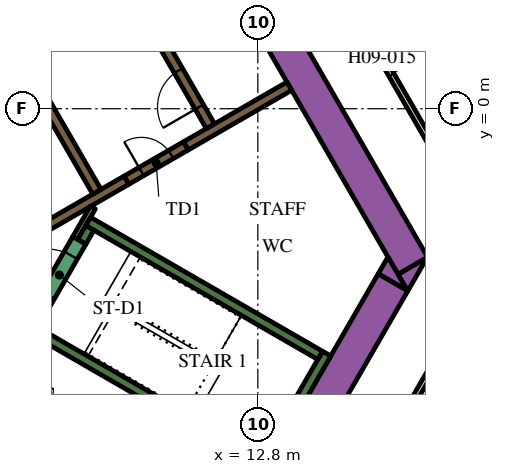
"""IFC4 building model, lengths in metres.
Left out: names, types, materials, properties, quantities, classifications, styles, units other than length and angle.
Written with IfcOpenShell. Run it as: python <this file> out.ifc"""

import sys

from ifc_helpers import new_model, si_unit, direction, frame, frame_2d, origin, place, context, subcontext, project, spatial, polyline, rectangle, outline, extrude, element, fill, save


model = new_model("IFC4")
c1 = context("Model", 3, precision=1e-05, world=origin(), true_north=direction((0.0, 1.0)))
c2 = subcontext(c1, "Body", "Model", "MODEL_VIEW")
j1 = project(units=[si_unit("LENGTHUNIT", "METRE"), si_unit("PLANEANGLEUNIT", "RADIAN")], contexts=[c1])
p1 = place(None, origin())
s1 = spatial("IfcSite", under=j1, at=p1, CompositionType="ELEMENT")
p2 = place(p1, origin())
s2 = spatial("IfcBuilding", under=s1, at=p2, CompositionType="ELEMENT")
p3 = place(p2, frame((0.0, 0.0, 118.8)))
s3 = spatial("IfcBuildingStorey", under=s2, at=p3, CompositionType="ELEMENT", Elevation=118.8)
p4 = place(p3, frame((6.776, 13.364, 0.0), z_axis=(0.0, 0.0, 1.0), x_axis=(0.500004177138, -0.8660229921, 0.0)))
e1 = element("IfcWall", 1, at=p4, inside=s3, PredefinedType="SOLIDWALL", context=c2, shape_type="SweptSolid", body=[
    extrude(rectangle(XDim=20.204, YDim=0.9, at=frame_2d((10.102, 0.0))), origin(), (0.0, 0.0, 1.0), 3.9),
])
p5 = place(p3, origin())
e2 = element("IfcWall", 2, at=p5, inside=s3, PredefinedType="SOLIDWALL", context=c2, shape_type="SweptSolid", body=[
    extrude(outline(polyline([(16.743, -4.8), (16.489, -4.36), (17.251, -3.92), (16.743, -4.8)])), origin(), (0.0, 0.0, 1.0), 3.9),
])
p6 = place(p3, frame((11.943, -12.214, 0.0), z_axis=(0.0, 0.0, 1.0), x_axis=(0.49998092645, 0.866036415623, 0.0)))
e3 = element("IfcWall", 3, at=p6, inside=s3, PredefinedType="SOLIDWALL", context=c2, shape_type="SweptSolid", body=[
    extrude(rectangle(XDim=8.83, YDim=0.9, at=frame_2d((4.415, 0.0))), origin(), (0.0, 0.0, 1.0), 3.9),
])
e4 = element("IfcWall", 4, at=p5, inside=s3, PredefinedType="SOLIDWALL", context=c2, shape_type="SweptSolid", body=[
    extrude(outline(polyline([(16.223, -3.9), (16.732, -4.78), (15.969, -4.34), (16.223, -3.9)])), origin(), (0.0, 0.0, 1.0), 3.9),
])
p7 = place(p3, frame((12.885, -9.431, 0.0), z_axis=(0.0, 0.0, 1.0), x_axis=(0.500020560727, 0.866013532718, 0.0)))
e5 = element("IfcWall", 5, at=p7, inside=s3, PredefinedType="SOLIDWALL", context=c2, shape_type="SweptSolid", body=[
    extrude(rectangle(XDim=3.45, YDim=0.25, at=frame_2d((1.725, 0.0))), origin(), (0.0, 0.0, 1.0), 3.9),
])
p8 = place(p3, frame((12.84, -9.261, 0.0), z_axis=(0.0, 0.0, 1.0), x_axis=(-0.866013990052, 0.500019768644, 0.0)))
e6 = element("IfcWall", 6, at=p8, inside=s3, PredefinedType="SOLIDWALL", context=c2, shape_type="SweptSolid", body=[
    extrude(rectangle(XDim=6.8, YDim=0.25, at=frame_2d((3.4, 0.0))), origin(), (0.0, 0.0, 1.0), 3.9),
])
p9 = place(p3, frame((8.334, -2.964, 0.0), z_axis=(0.0, 0.0, 1.0), x_axis=(0.866016039709, -0.500016218704, 0.0)))
e7 = element("IfcWall", 7, at=p9, inside=s3, PredefinedType="SOLIDWALL", context=c2, shape_type="SweptSolid", body=[
    extrude(rectangle(XDim=7.05, YDim=0.25, at=frame_2d((3.525, 0.0))), origin(), (0.0, 0.0, 1.0), 3.9),
])
p10 = place(p3, frame((8.168, -3.503, 0.0), z_axis=(0.0, 0.0, 1.0), x_axis=(0.49972245349, 0.866185586049, 0.0)))
e8 = element("IfcWall", 8, at=p10, inside=s3, PredefinedType="SOLIDWALL", context=c2, shape_type="SweptSolid", body=[
    extrude(rectangle(XDim=0.425, YDim=0.25, at=frame_2d((0.212, 0.0))), origin(), (0.0, 0.0, 1.0), 3.9),
])
p11 = place(p3, frame((13.629, 0.594, 0.0), z_axis=(0.0, 0.0, 1.0), x_axis=(-0.86602790099, -0.499995674689, 0.0)))
e9 = element("IfcWall", 9, at=p11, inside=s3, PredefinedType="SOLIDWALL", context=c2, shape_type="SweptSolid", body=[
    extrude(rectangle(XDim=3.146, YDim=0.25, at=frame_2d((1.573, 0.0))), origin(), (0.0, 0.0, 1.0), 3.9),
])
p12 = place(p3, frame((9.346, -1.879, 0.0), z_axis=(0.0, 0.0, 1.0), x_axis=(-0.866048528039, -0.499959945477, 0.0)))
e10 = element("IfcWall", 10, at=p12, inside=s3, PredefinedType="SOLIDWALL", context=c2, shape_type="SweptSolid", body=[
    extrude(rectangle(XDim=3.47, YDim=0.25, at=frame_2d((1.735, 0.0))), origin(), (0.0, 0.0, 1.0), 3.9),
])
p13 = place(p3, frame((8.459, -2.599, 0.0), z_axis=(0.0, 0.0, 1.0), x_axis=(-0.500041054325, -0.866001699761, 0.0)))
e11 = element("IfcWall", 11, at=p13, inside=s3, PredefinedType="PARTITIONING", context=c2, shape_type="SweptSolid", body=[
    extrude(rectangle(XDim=0.929, YDim=0.15, at=frame_2d((0.464, 0.0))), origin(), (0.0, 0.0, 1.0), 3.9),
])
p14 = place(p3, frame((11.553, -0.46, 0.0), z_axis=(0.0, 0.0, 1.0), x_axis=(-0.500006514828, 0.866021642414, 0.0)))
e12 = element("IfcWall", 12, at=p14, inside=s3, PredefinedType="SOLIDWALL", context=c2, shape_type="SweptSolid", body=[
    extrude(rectangle(XDim=12.35, YDim=0.25, at=frame_2d((6.175, 0.0))), origin(), (0.0, 0.0, 1.0), 3.9),
])
p15 = place(p14, frame((0.585, 0.0, 0.0)))
e13 = element("IfcOpeningElement", 13, at=p15, cuts=e12, PredefinedType="OPENING", context=c2, shape_type="SweptSolid", body=[
    extrude(rectangle(XDim=1.1, YDim=2.1, at=frame_2d((0.55, 1.05))), frame((0.0, 0.135, 0.0), z_axis=(0.0, -1.0, 0.0), x_axis=(1.0, 0.0, 0.0)), (0.0, 0.0, 1.0), 0.27),
])
p16 = place(p14, frame((3.105, 0.0, 0.0)))
e14 = element("IfcOpeningElement", 14, at=p16, cuts=e12, PredefinedType="OPENING", context=c2, shape_type="SweptSolid", body=[
    extrude(rectangle(XDim=1.1, YDim=2.1, at=frame_2d((0.55, 1.05))), frame((0.0, 0.135, 0.0), z_axis=(0.0, -1.0, 0.0), x_axis=(1.0, 0.0, 0.0)), (0.0, 0.0, 1.0), 0.27),
])
p17 = place(p14, frame((5.625, 0.0, 0.0)))
e15 = element("IfcOpeningElement", 15, at=p17, cuts=e12, PredefinedType="OPENING", context=c2, shape_type="SweptSolid", body=[
    extrude(rectangle(XDim=1.1, YDim=2.1, at=frame_2d((0.55, 1.05))), frame((0.0, 0.135, 0.0), z_axis=(0.0, -1.0, 0.0), x_axis=(1.0, 0.0, 0.0)), (0.0, 0.0, 1.0), 0.27),
])
p18 = place(p3, frame((8.565, -2.185, 0.0), z_axis=(0.0, 0.0, 1.0), x_axis=(-0.499997954832, 0.866026584559, 0.0)))
e16 = element("IfcWall", 16, at=p18, inside=s3, PredefinedType="SOLIDWALL", context=c2, shape_type="SweptSolid", body=[
    extrude(rectangle(XDim=12.35, YDim=0.25, at=frame_2d((6.175, 0.0))), origin(), (0.0, 0.0, 1.0), 3.9),
])
p19 = place(p18, frame((5.725, 0.0, 0.0)))
e17 = element("IfcOpeningElement", 17, at=p19, cuts=e16, PredefinedType="OPENING", context=c2, shape_type="SweptSolid", body=[
    extrude(rectangle(XDim=0.9, YDim=2.1, at=frame_2d((0.45, 1.05))), frame((0.0, 0.135, 0.0), z_axis=(0.0, -1.0, 0.0), x_axis=(1.0, 0.0, 0.0)), (0.0, 0.0, 1.0), 0.27),
])
p20 = place(p3, frame((7.053, -5.284, 0.0), z_axis=(0.0, 0.0, 1.0), x_axis=(0.500078061341, 0.865980330357, 0.0)))
e18 = element("IfcWall", 18, at=p20, inside=s3, PredefinedType="SOLIDWALL", context=c2, shape_type="SweptSolid", body=[
    extrude(rectangle(XDim=2.1, YDim=0.4, at=frame_2d((1.05, 0.0))), origin(), (0.0, 0.0, 1.0), 3.9),
])
p21 = place(p20, frame((0.45, 0.0, 0.0)))
e19 = element("IfcOpeningElement", 19, at=p21, cuts=e18, PredefinedType="OPENING", context=c2, shape_type="SweptSolid", body=[
    extrude(rectangle(XDim=1.2, YDim=2.1, at=frame_2d((0.6, 1.05))), frame((0.0, 0.21, 0.0), z_axis=(0.0, -1.0, 0.0), x_axis=(1.0, 0.0, 0.0)), (0.0, 0.0, 1.0), 0.42),
])
p22 = place(p3, frame((9.346, -1.879, 0.0), z_axis=(0.0, 0.0, 1.0), x_axis=(0.866047807691, 0.499961193289, 0.0)))
e20 = element("IfcWall", 20, at=p22, inside=s3, PredefinedType="SOLIDWALL", context=c2, shape_type="SweptSolid", body=[
    extrude(rectangle(XDim=1.8, YDim=0.25, at=frame_2d((0.9, 0.0))), origin(), (0.0, 0.0, 1.0), 3.9),
])
p23 = place(p22, frame((0.45, 0.0, 0.0)))
e21 = element("IfcOpeningElement", 21, at=p23, cuts=e20, PredefinedType="OPENING", context=c2, shape_type="SweptSolid", body=[
    extrude(rectangle(XDim=0.9, YDim=2.1, at=frame_2d((0.45, 1.05))), frame((0.0, 0.135, 0.0), z_axis=(0.0, -1.0, 0.0), x_axis=(1.0, 0.0, 0.0)), (0.0, 0.0, 1.0), 0.27),
])
p24 = place(p3, frame((19.081, -3.9, 0.0), z_axis=(0.0, 0.0, 1.0), x_axis=(-0.499974327079, -0.866040225545, 0.0)))
e22 = element("IfcWall", 22, at=p24, inside=s3, PredefinedType="PARTITIONING", context=c2, shape_type="SweptSolid", body=[
    extrude(rectangle(XDim=5.258, YDim=0.15, at=frame_2d((2.629, 0.0))), origin(), (0.0, 0.0, 1.0), 2.75),
])
p25 = place(p3, frame((6.163, 18.475, 0.0), z_axis=(0.0, 0.0, 1.0), x_axis=(0.500001317485, -0.866024643133, 0.0)))
e23 = element("IfcWall", 23, at=p25, inside=s3, PredefinedType="PARTITIONING", context=c2, shape_type="SweptSolid", body=[
    extrude(rectangle(XDim=25.767, YDim=0.15, at=frame_2d((12.883, 0.0))), origin(), (0.0, 0.0, 1.0), 2.75),
])
p26 = place(p25, frame((19.306, 0.0, 0.0)))
e24 = element("IfcOpeningElement", 24, at=p26, cuts=e23, PredefinedType="OPENING", context=c2, shape_type="SweptSolid", body=[
    extrude(rectangle(XDim=1.0, YDim=2.1, at=frame_2d((0.5, 1.05))), frame((0.0, 0.085, 0.0), z_axis=(0.0, -1.0, 0.0), x_axis=(1.0, 0.0, 0.0)), (0.0, 0.0, 1.0), 0.17),
])
p27 = place(p25, frame((17.999, 0.0, 0.0)))
e25 = element("IfcOpeningElement", 25, at=p27, cuts=e23, PredefinedType="OPENING", context=c2, shape_type="SweptSolid", body=[
    extrude(rectangle(XDim=1.0, YDim=2.1, at=frame_2d((0.5, 1.05))), frame((0.0, 0.085, 0.0), z_axis=(0.0, -1.0, 0.0), x_axis=(1.0, 0.0, 0.0)), (0.0, 0.0, 1.0), 0.17),
])
p28 = place(p25, frame((0.596, 0.0, 0.0)))
e26 = element("IfcOpeningElement", 26, at=p28, cuts=e23, PredefinedType="OPENING", context=c2, shape_type="SweptSolid", body=[
    extrude(rectangle(XDim=1.0, YDim=2.1, at=frame_2d((0.5, 1.05))), frame((0.0, 0.085, 0.0), z_axis=(0.0, -1.0, 0.0), x_axis=(1.0, 0.0, 0.0)), (0.0, 0.0, 1.0), 0.17),
])
p29 = place(p3, frame((26.591, -3.122, 0.0), z_axis=(0.0, 0.0, 1.0), x_axis=(-0.893766213273, -0.448533115847, 0.0)))
e27 = element("IfcWall", 27, at=p29, inside=s3, PredefinedType="PARTITIONING", context=c2, shape_type="SweptSolid", body=[
    extrude(rectangle(XDim=10.875, YDim=0.15, at=frame_2d((5.438, 0.0))), origin(), (0.0, 0.0, 1.0), 2.75),
])
p30 = place(p15, origin())
e28 = element("IfcDoor", 28, at=p30, inside=s3, OperationType="DOUBLE_DOOR_SLIDING", PredefinedType="DOOR", context=c2, shape_type="SweptSolid", body=[
    extrude(rectangle(XDim=1.1, YDim=2.1, at=frame_2d((0.55, 1.05))), frame((0.0, 0.025, 0.0), z_axis=(0.0, -1.0, 0.0), x_axis=(1.0, 0.0, 0.0)), (0.0, 0.0, 1.0), 0.05),
])
fill(e13, e28)
p31 = place(p21, origin())
e29 = element("IfcDoor", 29, at=p31, inside=s3, OperationType="SINGLE_SWING_LEFT", PredefinedType="DOOR", context=c2, shape_type="SweptSolid", body=[
    extrude(rectangle(XDim=1.2, YDim=2.1, at=frame_2d((0.6, 1.05))), frame((0.0, 0.025, 0.0), z_axis=(0.0, -1.0, 0.0), x_axis=(1.0, 0.0, 0.0)), (0.0, 0.0, 1.0), 0.05),
])
fill(e19, e29)
p32 = place(p23, origin())
e30 = element("IfcDoor", 30, at=p32, inside=s3, OperationType="SINGLE_SWING_LEFT", PredefinedType="DOOR", context=c2, shape_type="SweptSolid", body=[
    extrude(rectangle(XDim=0.9, YDim=2.1, at=frame_2d((0.45, 1.05))), frame((0.0, 0.025, 0.0), z_axis=(0.0, -1.0, 0.0), x_axis=(1.0, 0.0, 0.0)), (0.0, 0.0, 1.0), 0.05),
])
fill(e21, e30)
p33 = place(p26, origin())
e31 = element("IfcDoor", 31, at=p33, inside=s3, OperationType="SINGLE_SWING_LEFT", PredefinedType="DOOR", context=c2, shape_type="SweptSolid", body=[
    extrude(rectangle(XDim=1.0, YDim=2.1, at=frame_2d((0.5, 1.05))), frame((0.0, 0.025, 0.0), z_axis=(0.0, -1.0, 0.0), x_axis=(1.0, 0.0, 0.0)), (0.0, 0.0, 1.0), 0.05),
])
fill(e24, e31)
save(model, sys.argv[1])
